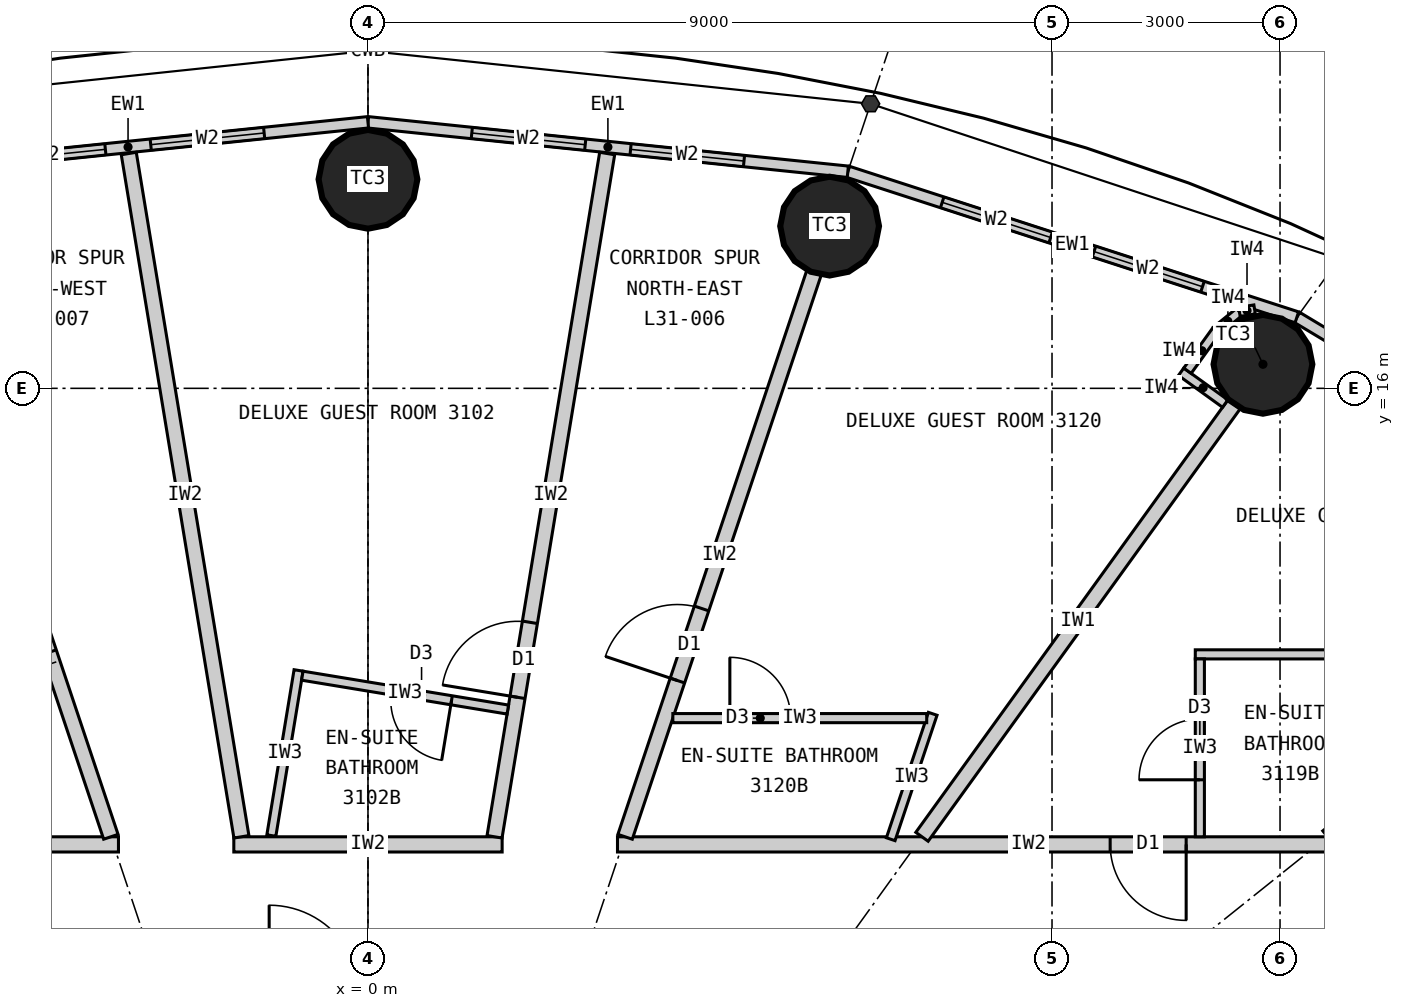
"""IFC4 building model, lengths in metres.
Left out: names, types, materials, properties, quantities, classifications, styles, units other than length and angle.
Written with IfcOpenShell. Run it as: python <this file> out.ifc"""

import sys

from ifc_helpers import new_model, si_unit, direction, frame, frame_2d, origin, origin_2d, place, context, subcontext, project, spatial, rectangle, circle, extrude, element, fill, save


model = new_model("IFC4")
c1 = context("Model", 3, precision=1e-05, world=origin(), true_north=direction((0.0, 1.0)))
c2 = subcontext(c1, "Body", "Model", "MODEL_VIEW")
j1 = project(units=[si_unit("LENGTHUNIT", "METRE"), si_unit("PLANEANGLEUNIT", "RADIAN")], contexts=[c1])
p1 = place(None, origin())
s1 = spatial("IfcSite", under=j1, at=p1, CompositionType="ELEMENT")
p2 = place(p1, origin())
s2 = spatial("IfcBuilding", under=s1, at=p2, CompositionType="ELEMENT")
p3 = place(p2, frame((0.0, 0.0, 122.1)))
s3 = spatial("IfcBuildingStorey", under=s2, at=p3, CompositionType="ELEMENT", Elevation=122.1)
for number, where, z_axis, x_axis in (
    (1, (11.775, 16.316, 0.0), (0.0, 0.0, 1.0), (1.0, 0.0, 0.0)),
    (2, (6.074, 18.135, 0.0), (0.0, 0.0, 1.0), (1.0, 0.0, 0.0)),
    (3, (0.0, 18.75, 0.0), (0.0, 0.0, 1.0), (1.0, 0.0, 0.0)),
):
    element("IfcColumn", number, at=place(p3, frame(where, z_axis=z_axis, x_axis=x_axis)), inside=s3, PredefinedType="COLUMN", context=c2, shape_type="SweptSolid", body=[
        extrude(circle(Radius=0.65, at=origin_2d()), origin(), (0.0, 0.0, 1.0), 3.3),
    ])
p4 = place(p3, frame((17.332, 13.866, 0.0), z_axis=(0.0, 0.0, 1.0), x_axis=(-0.857308573723, 0.514802884044, 0.0)))
e4 = element("IfcWall", 4, at=p4, inside=s3, PredefinedType="ELEMENTEDWALL", context=c2, shape_type="SweptSolid", body=[
    extrude(rectangle(XDim=5.961, YDim=0.15, at=frame_2d((2.98, 0.0))), origin(), (0.0, 0.0, 1.0), 3.12),
])
p5 = place(p4, frame((1.181, 0.0, 0.9)))
e5 = element("IfcOpeningElement", 5, at=p5, cuts=e4, PredefinedType="OPENING", context=c2, shape_type="SweptSolid", body=[
    extrude(rectangle(XDim=1.5, YDim=1.9, at=frame_2d((0.75, 0.95))), frame((0.0, 0.085, 0.0), z_axis=(0.0, -1.0, 0.0), x_axis=(1.0, 0.0, 0.0)), (0.0, 0.0, 1.0), 0.17),
])
p6 = place(p4, frame((3.281, 0.0, 0.9)))
e6 = element("IfcOpeningElement", 6, at=p6, cuts=e4, PredefinedType="OPENING", context=c2, shape_type="SweptSolid", body=[
    extrude(rectangle(XDim=1.5, YDim=1.9, at=frame_2d((0.75, 0.95))), frame((0.0, 0.085, 0.0), z_axis=(0.0, -1.0, 0.0), x_axis=(1.0, 0.0, 0.0)), (0.0, 0.0, 1.0), 0.17),
])
p7 = place(p3, frame((12.221, 16.935, 0.0), z_axis=(0.0, 0.0, 1.0), x_axis=(-0.951272691506, 0.308350881944, 0.0)))
e7 = element("IfcWall", 7, at=p7, inside=s3, PredefinedType="ELEMENTEDWALL", context=c2, shape_type="SweptSolid", body=[
    extrude(rectangle(XDim=6.211, YDim=0.15, at=frame_2d((3.105, 0.0))), origin(), (0.0, 0.0, 1.0), 3.12),
])
p8 = place(p7, frame((1.305, 0.0, 0.9)))
e8 = element("IfcOpeningElement", 8, at=p8, cuts=e7, PredefinedType="OPENING", context=c2, shape_type="SweptSolid", body=[
    extrude(rectangle(XDim=1.5, YDim=1.9, at=frame_2d((0.75, 0.95))), frame((0.0, 0.085, 0.0), z_axis=(0.0, -1.0, 0.0), x_axis=(1.0, 0.0, 0.0)), (0.0, 0.0, 1.0), 0.17),
])
p9 = place(p7, frame((3.405, 0.0, 0.9)))
e9 = element("IfcOpeningElement", 9, at=p9, cuts=e7, PredefinedType="OPENING", context=c2, shape_type="SweptSolid", body=[
    extrude(rectangle(XDim=1.5, YDim=1.9, at=frame_2d((0.75, 0.95))), frame((0.0, 0.085, 0.0), z_axis=(0.0, -1.0, 0.0), x_axis=(1.0, 0.0, 0.0)), (0.0, 0.0, 1.0), 0.17),
])
p10 = place(p3, frame((6.313, 18.85, 0.0), z_axis=(0.0, 0.0, 1.0), x_axis=(-0.994735690163, 0.102473931887, 0.0)))
e10 = element("IfcWall", 10, at=p10, inside=s3, PredefinedType="ELEMENTEDWALL", context=c2, shape_type="SweptSolid", body=[
    extrude(rectangle(XDim=6.347, YDim=0.15, at=frame_2d((3.173, 0.0))), origin(), (0.0, 0.0, 1.0), 3.12),
])
p11 = place(p10, frame((1.373, 0.0, 0.9)))
e11 = element("IfcOpeningElement", 11, at=p11, cuts=e10, PredefinedType="OPENING", context=c2, shape_type="SweptSolid", body=[
    extrude(rectangle(XDim=1.5, YDim=1.9, at=frame_2d((0.75, 0.95))), frame((0.0, 0.085, 0.0), z_axis=(0.0, -1.0, 0.0), x_axis=(1.0, 0.0, 0.0)), (0.0, 0.0, 1.0), 0.17),
])
p12 = place(p10, frame((3.473, 0.0, 0.9)))
e12 = element("IfcOpeningElement", 12, at=p12, cuts=e10, PredefinedType="OPENING", context=c2, shape_type="SweptSolid", body=[
    extrude(rectangle(XDim=1.5, YDim=1.9, at=frame_2d((0.75, 0.95))), frame((0.0, 0.085, 0.0), z_axis=(0.0, -1.0, 0.0), x_axis=(1.0, 0.0, 0.0)), (0.0, 0.0, 1.0), 0.17),
])
p13 = place(p3, frame((0.0, 19.5, 0.0), z_axis=(0.0, 0.0, 1.0), x_axis=(-0.994735690163, -0.102473931887, 0.0)))
e13 = element("IfcWall", 13, at=p13, inside=s3, PredefinedType="ELEMENTEDWALL", context=c2, shape_type="SweptSolid", body=[
    extrude(rectangle(XDim=6.347, YDim=0.15, at=frame_2d((3.173, 0.0))), origin(), (0.0, 0.0, 1.0), 3.12),
])
p14 = place(p13, frame((1.373, 0.0, 0.9)))
e14 = element("IfcOpeningElement", 14, at=p14, cuts=e13, PredefinedType="OPENING", context=c2, shape_type="SweptSolid", body=[
    extrude(rectangle(XDim=1.5, YDim=1.9, at=frame_2d((0.75, 0.95))), frame((0.0, 0.085, 0.0), z_axis=(0.0, -1.0, 0.0), x_axis=(1.0, 0.0, 0.0)), (0.0, 0.0, 1.0), 0.17),
])
p15 = place(p13, frame((3.473, 0.0, 0.9)))
e15 = element("IfcOpeningElement", 15, at=p15, cuts=e13, PredefinedType="OPENING", context=c2, shape_type="SweptSolid", body=[
    extrude(rectangle(XDim=1.5, YDim=1.9, at=frame_2d((0.75, 0.95))), frame((0.0, 0.085, 0.0), z_axis=(0.0, -1.0, 0.0), x_axis=(1.0, 0.0, 0.0)), (0.0, 0.0, 1.0), 0.17),
])
p16 = place(p3, frame((-14.1, 10.0, 0.0), z_axis=(0.0, 0.0, 1.0), x_axis=(1.0, 0.0, 0.0)))
e16 = element("IfcWall", 16, at=p16, inside=s3, PredefinedType="PARTITIONING", context=c2, shape_type="SweptSolid", body=[
    extrude(rectangle(XDim=10.817, YDim=0.2, at=frame_2d((5.409, 0.0))), origin(), (0.0, 0.0, 1.0), 3.12),
])
p17 = place(p3, frame((-1.765, 10.0, 0.0), z_axis=(0.0, 0.0, 1.0), x_axis=(1.0, 0.0, 0.0)))
e17 = element("IfcWall", 17, at=p17, inside=s3, PredefinedType="PARTITIONING", context=c2, shape_type="SweptSolid", body=[
    extrude(rectangle(XDim=3.53, YDim=0.2, at=frame_2d((1.765, 0.0))), origin(), (0.0, 0.0, 1.0), 3.12),
])
p18 = place(p3, frame((3.283, 10.0, 0.0), z_axis=(0.0, 0.0, 1.0), x_axis=(1.0, 0.0, 0.0)))
e18 = element("IfcWall", 18, at=p18, inside=s3, PredefinedType="PARTITIONING", context=c2, shape_type="SweptSolid", body=[
    extrude(rectangle(XDim=10.817, YDim=0.2, at=frame_2d((5.409, 0.0))), origin(), (0.0, 0.0, 1.0), 3.12),
])
p19 = place(p18, frame((6.482, 0.0, 0.0)))
e19 = element("IfcOpeningElement", 19, at=p19, cuts=e18, PredefinedType="OPENING", context=c2, shape_type="SweptSolid", body=[
    extrude(rectangle(XDim=1.0, YDim=2.2, at=frame_2d((0.5, 1.1))), frame((0.0, 0.11, 0.0), z_axis=(0.0, -1.0, 0.0), x_axis=(1.0, 0.0, 0.0)), (0.0, 0.0, 1.0), 0.22),
])
p20 = place(p3, frame((12.625, 10.1, 0.0), z_axis=(0.0, 0.0, 1.0), x_axis=(0.780863644897, 0.624701503182, 0.0)))
e20 = element("IfcWall", 20, at=p20, inside=s3, PredefinedType="PARTITIONING", context=c2, shape_type="SweptSolid", body=[
    extrude(rectangle(XDim=4.612, YDim=0.2, at=frame_2d((2.306, 0.0))), origin(), (0.0, 0.0, 1.0), 2.37),
])
p21 = place(p3, frame((7.289, 10.1, 0.0), z_axis=(0.0, 0.0, 1.0), x_axis=(0.585217367024, 0.81087645997, 0.0)))
e21 = element("IfcWall", 21, at=p21, inside=s3, PredefinedType="PARTITIONING", context=c2, shape_type="SweptSolid", body=[
    extrude(rectangle(XDim=7.016, YDim=0.2, at=frame_2d((3.508, 0.0))), origin(), (0.0, 0.0, 1.0), 2.37),
])
p22 = place(p3, frame((3.383, 10.1, 0.0), z_axis=(0.0, 0.0, 1.0), x_axis=(0.317603705574, 0.948223542318, 0.0)))
e22 = element("IfcWall", 22, at=p22, inside=s3, PredefinedType="PARTITIONING", context=c2, shape_type="SweptSolid", body=[
    extrude(rectangle(XDim=7.823, YDim=0.2, at=frame_2d((3.912, 0.0))), origin(), (0.0, 0.0, 1.0), 2.37),
])
p23 = place(p22, frame((2.168, 0.0, 0.0)))
e23 = element("IfcOpeningElement", 23, at=p23, cuts=e22, PredefinedType="OPENING", context=c2, shape_type="SweptSolid", body=[
    extrude(rectangle(XDim=1.0, YDim=2.2, at=frame_2d((0.5, 1.1))), frame((0.0, 0.11, 0.0), z_axis=(0.0, -1.0, 0.0), x_axis=(1.0, 0.0, 0.0)), (0.0, 0.0, 1.0), 0.22),
])
p24 = place(p3, frame((1.665, 10.1, 0.0), z_axis=(0.0, 0.0, 1.0), x_axis=(0.162660519103, 0.986682094459, 0.0)))
e24 = element("IfcWall", 24, at=p24, inside=s3, PredefinedType="PARTITIONING", context=c2, shape_type="SweptSolid", body=[
    extrude(rectangle(XDim=9.111, YDim=0.2, at=frame_2d((4.555, 0.0))), origin(), (0.0, 0.0, 1.0), 3.12),
])
p25 = place(p24, frame((1.86, 0.0, 0.0)))
e25 = element("IfcOpeningElement", 25, at=p25, cuts=e24, PredefinedType="OPENING", context=c2, shape_type="SweptSolid", body=[
    extrude(rectangle(XDim=1.0, YDim=2.2, at=frame_2d((0.5, 1.1))), frame((0.0, 0.11, 0.0), z_axis=(0.0, -1.0, 0.0), x_axis=(1.0, 0.0, 0.0)), (0.0, 0.0, 1.0), 0.22),
])
p26 = place(p3, frame((-1.665, 10.1, 0.0), z_axis=(0.0, 0.0, 1.0), x_axis=(-0.162660519103, 0.986682094459, 0.0)))
e26 = element("IfcWall", 26, at=p26, inside=s3, PredefinedType="PARTITIONING", context=c2, shape_type="SweptSolid", body=[
    extrude(rectangle(XDim=9.111, YDim=0.2, at=frame_2d((4.555, 0.0))), origin(), (0.0, 0.0, 1.0), 3.12),
])
p27 = place(p3, frame((-3.383, 10.1, 0.0), z_axis=(0.0, 0.0, 1.0), x_axis=(-0.317603705574, 0.948223542318, 0.0)))
e27 = element("IfcWall", 27, at=p27, inside=s3, PredefinedType="PARTITIONING", context=c2, shape_type="SweptSolid", body=[
    extrude(rectangle(XDim=7.823, YDim=0.2, at=frame_2d((3.912, 0.0))), origin(), (0.0, 0.0, 1.0), 2.37),
])
p28 = place(p27, frame((2.56, 0.0, 0.0)))
e28 = element("IfcOpeningElement", 28, at=p28, cuts=e27, PredefinedType="OPENING", context=c2, shape_type="SweptSolid", body=[
    extrude(rectangle(XDim=1.0, YDim=2.2, at=frame_2d((0.5, 1.1))), frame((0.0, 0.11, 0.0), z_axis=(0.0, -1.0, 0.0), x_axis=(1.0, 0.0, 0.0)), (0.0, 0.0, 1.0), 0.22),
])
p29 = place(p3, frame((-1.271, 10.116, 0.0), z_axis=(0.0, 0.0, 1.0), x_axis=(0.162672481395, 0.986680122328, 0.0)))
e29 = element("IfcWall", 29, at=p29, inside=s3, PredefinedType="PARTITIONING", context=c2, shape_type="SweptSolid", body=[
    extrude(rectangle(XDim=2.202, YDim=0.12, at=frame_2d((1.101, 0.0))), origin(), (0.0, 0.0, 1.0), 3.12),
])
p30 = place(p3, frame((1.84, 11.774, 0.0), z_axis=(0.0, 0.0, 1.0), x_axis=(-0.986676602341, 0.162693830222, 0.0)))
e30 = element("IfcWall", 30, at=p30, inside=s3, PredefinedType="PARTITIONING", context=c2, shape_type="SweptSolid", body=[
    extrude(rectangle(XDim=2.74, YDim=0.12, at=frame_2d((1.37, 0.0))), origin(), (0.0, 0.0, 1.0), 3.12),
])
p31 = place(p30, frame((0.75, 0.0, 0.0)))
e31 = element("IfcOpeningElement", 31, at=p31, cuts=e30, PredefinedType="OPENING", context=c2, shape_type="SweptSolid", body=[
    extrude(rectangle(XDim=0.8, YDim=2.1, at=frame_2d((0.4, 1.05))), frame((0.0, 0.07, 0.0), z_axis=(0.0, -1.0, 0.0), x_axis=(1.0, 0.0, 0.0)), (0.0, 0.0, 1.0), 0.14),
])
p32 = place(p3, frame((15.525, 12.5, 0.0), z_axis=(0.0, 0.0, 1.0), x_axis=(-1.0, 0.0, 0.0)))
e32 = element("IfcWall", 32, at=p32, inside=s3, PredefinedType="PARTITIONING", context=c2, shape_type="SweptSolid", body=[
    extrude(rectangle(XDim=4.64, YDim=0.12, at=frame_2d((2.32, 0.0))), origin(), (0.0, 0.0, 1.0), 3.12),
])
p33 = place(p3, frame((10.945, 10.1, 0.0), z_axis=(0.0, 0.0, 1.0), x_axis=(0.0, 1.0, 0.0)))
e33 = element("IfcWall", 33, at=p33, inside=s3, PredefinedType="PARTITIONING", context=c2, shape_type="SweptSolid", body=[
    extrude(rectangle(XDim=2.34, YDim=0.12, at=frame_2d((1.17, 0.0))), origin(), (0.0, 0.0, 1.0), 3.12),
])
p34 = place(p33, frame((0.75, 0.0, 0.0)))
e34 = element("IfcOpeningElement", 34, at=p34, cuts=e33, PredefinedType="OPENING", context=c2, shape_type="SweptSolid", body=[
    extrude(rectangle(XDim=0.8, YDim=2.1, at=frame_2d((0.4, 1.05))), frame((0.0, 0.07, 0.0), z_axis=(0.0, -1.0, 0.0), x_axis=(1.0, 0.0, 0.0)), (0.0, 0.0, 1.0), 0.14),
])
p35 = place(p3, frame((6.878, 10.068, 0.0), z_axis=(0.0, 0.0, 1.0), x_axis=(0.317532394508, 0.948247424694, 0.0)))
e35 = element("IfcWall", 35, at=p35, inside=s3, PredefinedType="PARTITIONING", context=c2, shape_type="SweptSolid", body=[
    extrude(rectangle(XDim=1.74, YDim=0.12, at=frame_2d((0.87, 0.0))), origin(), (0.0, 0.0, 1.0), 3.12),
])
p36 = place(p3, frame((4.011, 11.661, 0.0), z_axis=(0.0, 0.0, 1.0), x_axis=(1.0, 0.0, 0.0)))
e36 = element("IfcWall", 36, at=p36, inside=s3, PredefinedType="PARTITIONING", context=c2, shape_type="SweptSolid", body=[
    extrude(rectangle(XDim=3.34, YDim=0.12, at=frame_2d((1.67, 0.0))), origin(), (0.0, 0.0, 1.0), 3.12),
])
p37 = place(p36, frame((0.75, 0.0, 0.0)))
e37 = element("IfcOpeningElement", 37, at=p37, cuts=e36, PredefinedType="OPENING", context=c2, shape_type="SweptSolid", body=[
    extrude(rectangle(XDim=0.8, YDim=2.1, at=frame_2d((0.4, 1.05))), frame((0.0, 0.07, 0.0), z_axis=(0.0, -1.0, 0.0), x_axis=(1.0, 0.0, 0.0)), (0.0, 0.0, 1.0), 0.14),
])
p38 = place(p3, frame((11.279, 15.799, 0.0), z_axis=(0.0, 0.0, 1.0), x_axis=(-0.810912957127, 0.585166793285, 0.0)))
e38 = element("IfcWall", 38, at=p38, inside=s3, PredefinedType="PARTITIONING", context=c2, shape_type="SweptSolid", body=[
    extrude(rectangle(XDim=0.716, YDim=0.12, at=frame_2d((0.358, 0.0))), origin(), (0.0, 0.0, 1.0), 3.12),
])
p39 = place(p3, frame((10.782, 16.231, 0.0), z_axis=(0.0, 0.0, 1.0), x_axis=(0.585175102182, 0.810906961239, 0.0)))
e39 = element("IfcWall", 39, at=p39, inside=s3, PredefinedType="PARTITIONING", context=c2, shape_type="SweptSolid", body=[
    extrude(rectangle(XDim=0.65, YDim=0.12, at=frame_2d((0.325, 0.0))), origin(), (0.0, 0.0, 1.0), 3.12),
])
p40 = place(p3, frame((11.162, 16.759, 0.0), z_axis=(0.0, 0.0, 1.0), x_axis=(0.775178428527, 0.63174235567, 0.0)))
e40 = element("IfcWall", 40, at=p40, inside=s3, PredefinedType="PARTITIONING", context=c2, shape_type="SweptSolid", body=[
    extrude(rectangle(XDim=0.392, YDim=0.12, at=frame_2d((0.196, 0.0))), origin(), (0.0, 0.0, 1.0), 3.12),
])
p41 = place(p3, frame((11.466, 17.006, 0.0), z_axis=(0.0, 0.0, 1.0), x_axis=(0.987228877621, 0.15930832744, 0.0)))
e41 = element("IfcWall", 41, at=p41, inside=s3, PredefinedType="PARTITIONING", context=c2, shape_type="SweptSolid", body=[
    extrude(rectangle(XDim=0.202, YDim=0.12, at=frame_2d((0.101, 0.0))), origin(), (0.0, 0.0, 1.0), 3.12),
])
p42 = place(p8, origin())
e42 = element("IfcWindow", 42, at=p42, inside=s3, PartitioningType="SINGLE_PANEL", PredefinedType="WINDOW", context=c2, shape_type="SweptSolid", body=[
    extrude(rectangle(XDim=1.5, YDim=1.9, at=frame_2d((0.75, 0.95))), frame((0.0, 0.03, 0.0), z_axis=(0.0, -1.0, 0.0), x_axis=(1.0, 0.0, 0.0)), (0.0, 0.0, 1.0), 0.06),
])
fill(e8, e42)
p43 = place(p9, origin())
e43 = element("IfcWindow", 43, at=p43, inside=s3, PartitioningType="SINGLE_PANEL", PredefinedType="WINDOW", context=c2, shape_type="SweptSolid", body=[
    extrude(rectangle(XDim=1.5, YDim=1.9, at=frame_2d((0.75, 0.95))), frame((0.0, 0.03, 0.0), z_axis=(0.0, -1.0, 0.0), x_axis=(1.0, 0.0, 0.0)), (0.0, 0.0, 1.0), 0.06),
])
fill(e9, e43)
p44 = place(p11, origin())
e44 = element("IfcWindow", 44, at=p44, inside=s3, PartitioningType="SINGLE_PANEL", PredefinedType="WINDOW", context=c2, shape_type="SweptSolid", body=[
    extrude(rectangle(XDim=1.5, YDim=1.9, at=frame_2d((0.75, 0.95))), frame((0.0, 0.03, 0.0), z_axis=(0.0, -1.0, 0.0), x_axis=(1.0, 0.0, 0.0)), (0.0, 0.0, 1.0), 0.06),
])
fill(e11, e44)
p45 = place(p12, origin())
e45 = element("IfcWindow", 45, at=p45, inside=s3, PartitioningType="SINGLE_PANEL", PredefinedType="WINDOW", context=c2, shape_type="SweptSolid", body=[
    extrude(rectangle(XDim=1.5, YDim=1.9, at=frame_2d((0.75, 0.95))), frame((0.0, 0.03, 0.0), z_axis=(0.0, -1.0, 0.0), x_axis=(1.0, 0.0, 0.0)), (0.0, 0.0, 1.0), 0.06),
])
fill(e12, e45)
p46 = place(p14, origin())
e46 = element("IfcWindow", 46, at=p46, inside=s3, PartitioningType="SINGLE_PANEL", PredefinedType="WINDOW", context=c2, shape_type="SweptSolid", body=[
    extrude(rectangle(XDim=1.5, YDim=1.9, at=frame_2d((0.75, 0.95))), frame((0.0, 0.03, 0.0), z_axis=(0.0, -1.0, 0.0), x_axis=(1.0, 0.0, 0.0)), (0.0, 0.0, 1.0), 0.06),
])
fill(e14, e46)
p47 = place(p15, origin())
e47 = element("IfcWindow", 47, at=p47, inside=s3, PartitioningType="SINGLE_PANEL", PredefinedType="WINDOW", context=c2, shape_type="SweptSolid", body=[
    extrude(rectangle(XDim=1.5, YDim=1.9, at=frame_2d((0.75, 0.95))), frame((0.0, 0.03, 0.0), z_axis=(0.0, -1.0, 0.0), x_axis=(1.0, 0.0, 0.0)), (0.0, 0.0, 1.0), 0.06),
])
fill(e15, e47)
p48 = place(p31, origin())
e48 = element("IfcDoor", 48, at=p48, inside=s3, OperationType="SINGLE_SWING_LEFT", PredefinedType="DOOR", context=c2, shape_type="SweptSolid", body=[
    extrude(rectangle(XDim=0.8, YDim=2.1, at=frame_2d((0.4, 1.05))), frame((0.0, 0.025, 0.0), z_axis=(0.0, -1.0, 0.0), x_axis=(1.0, 0.0, 0.0)), (0.0, 0.0, 1.0), 0.05),
])
fill(e31, e48)
p49 = place(p25, origin())
e49 = element("IfcDoor", 49, at=p49, inside=s3, OperationType="SINGLE_SWING_LEFT", PredefinedType="DOOR", context=c2, shape_type="SweptSolid", body=[
    extrude(rectangle(XDim=1.0, YDim=2.2, at=frame_2d((0.5, 1.1))), frame((0.0, 0.025, 0.0), z_axis=(0.0, -1.0, 0.0), x_axis=(1.0, 0.0, 0.0)), (0.0, 0.0, 1.0), 0.05),
])
fill(e25, e49)
p50 = place(p34, origin())
e50 = element("IfcDoor", 50, at=p50, inside=s3, OperationType="SINGLE_SWING_LEFT", PredefinedType="DOOR", context=c2, shape_type="SweptSolid", body=[
    extrude(rectangle(XDim=0.8, YDim=2.1, at=frame_2d((0.4, 1.05))), frame((0.0, 0.025, 0.0), z_axis=(0.0, -1.0, 0.0), x_axis=(1.0, 0.0, 0.0)), (0.0, 0.0, 1.0), 0.05),
])
fill(e34, e50)
p51 = place(p19, origin())
e51 = element("IfcDoor", 51, at=p51, inside=s3, OperationType="SINGLE_SWING_RIGHT", PredefinedType="DOOR", context=c2, shape_type="SweptSolid", body=[
    extrude(rectangle(XDim=1.0, YDim=2.2, at=frame_2d((0.5, 1.1))), frame((0.0, 0.025, 0.0), z_axis=(0.0, -1.0, 0.0), x_axis=(1.0, 0.0, 0.0)), (0.0, 0.0, 1.0), 0.05),
])
fill(e19, e51)
p52 = place(p37, origin())
e52 = element("IfcDoor", 52, at=p52, inside=s3, OperationType="SINGLE_SWING_LEFT", PredefinedType="DOOR", context=c2, shape_type="SweptSolid", body=[
    extrude(rectangle(XDim=0.8, YDim=2.1, at=frame_2d((0.4, 1.05))), frame((0.0, 0.025, 0.0), z_axis=(0.0, -1.0, 0.0), x_axis=(1.0, 0.0, 0.0)), (0.0, 0.0, 1.0), 0.05),
])
fill(e37, e52)
p53 = place(p23, origin())
e53 = element("IfcDoor", 53, at=p53, inside=s3, OperationType="SINGLE_SWING_LEFT", PredefinedType="DOOR", context=c2, shape_type="SweptSolid", body=[
    extrude(rectangle(XDim=1.0, YDim=2.2, at=frame_2d((0.5, 1.1))), frame((0.0, 0.025, 0.0), z_axis=(0.0, -1.0, 0.0), x_axis=(1.0, 0.0, 0.0)), (0.0, 0.0, 1.0), 0.05),
])
fill(e23, e53)
save(model, sys.argv[1])
